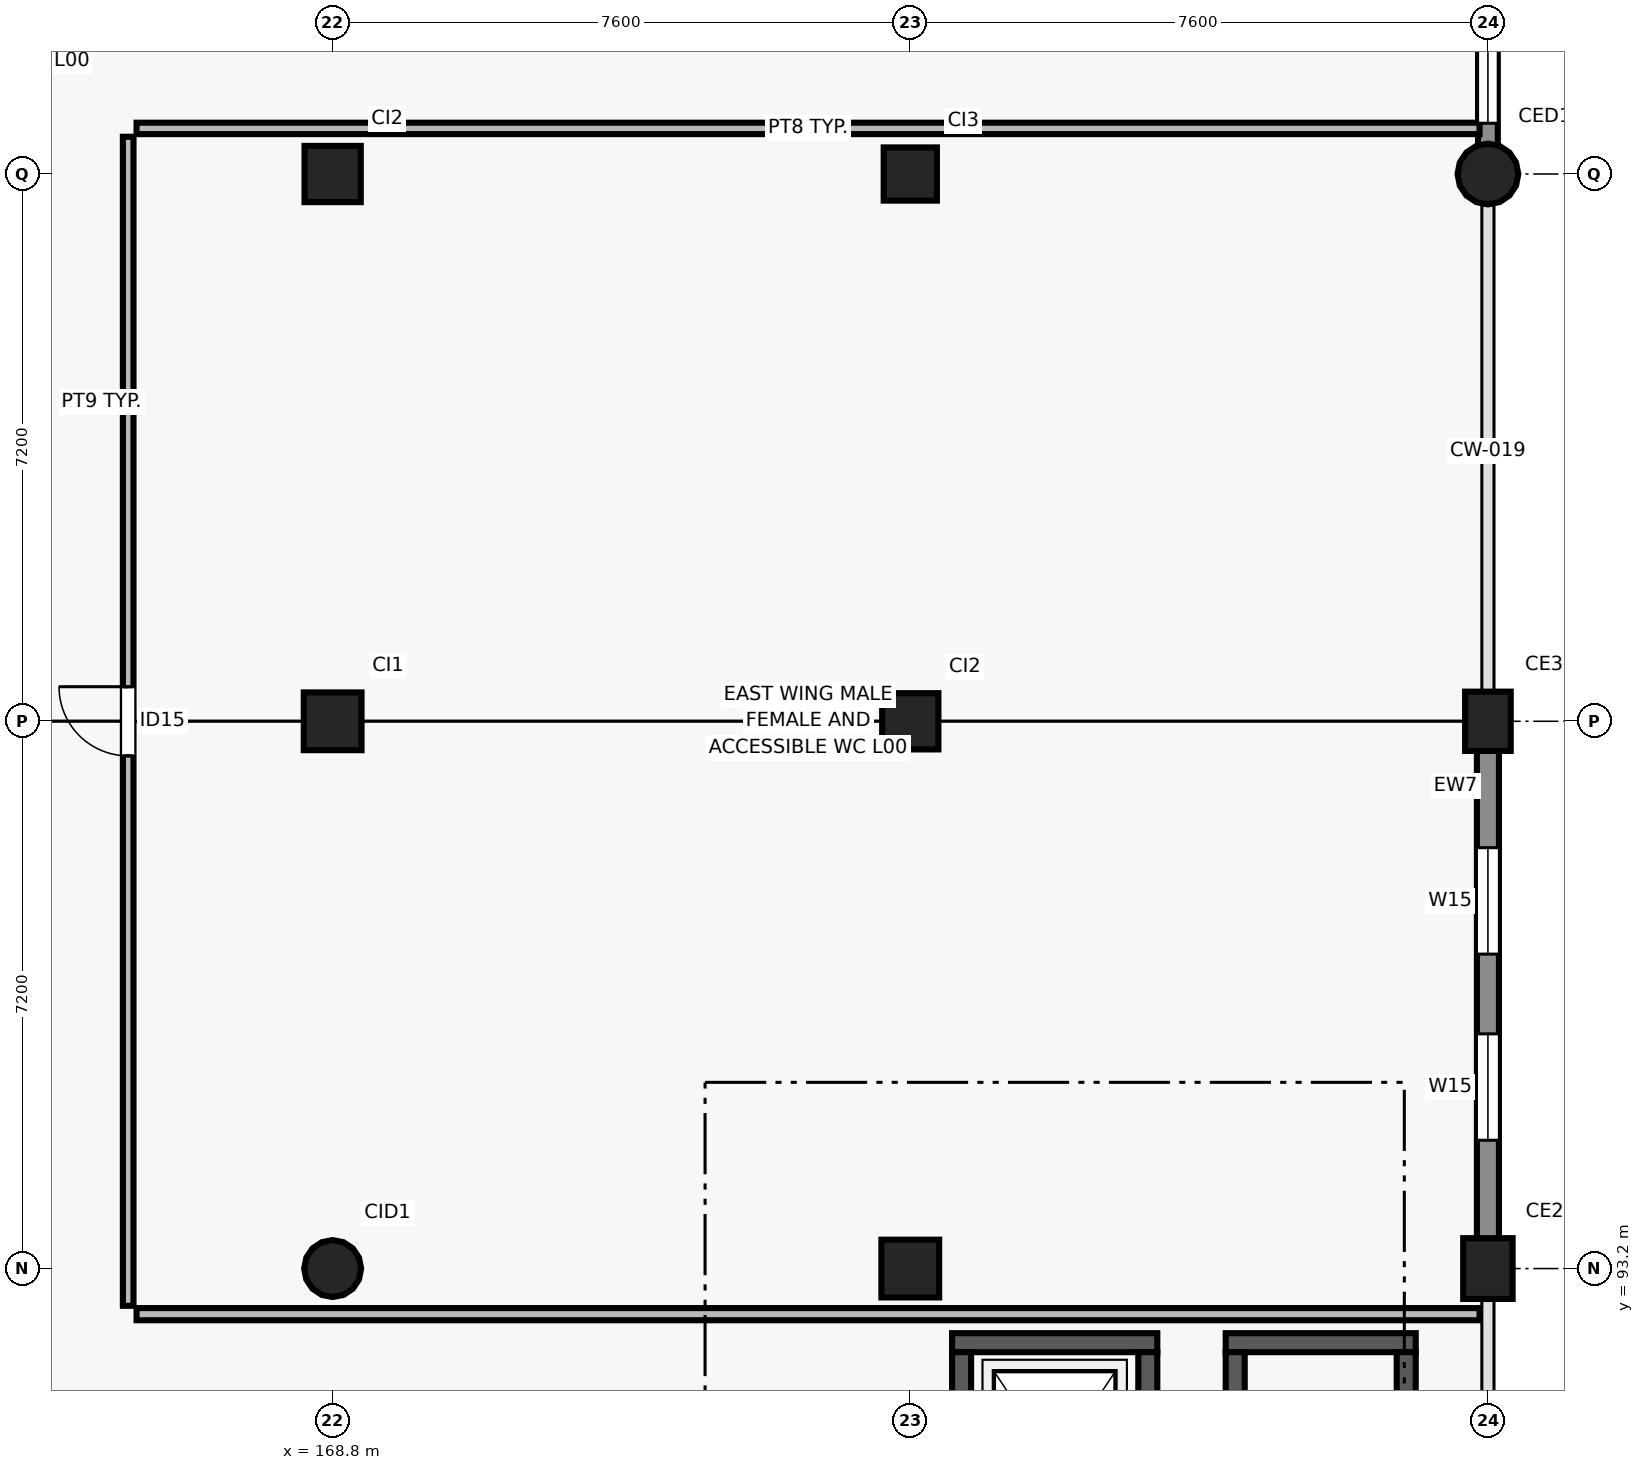
"""IFC4 building model, lengths in metres.
Left out: names, types, materials, properties, quantities, classifications, styles, units other than length and angle.
Written with IfcOpenShell. Run it as: python <this file> out.ifc"""

import sys

from ifc_helpers import new_model, si_unit, direction, frame, frame_2d, origin, origin_2d, place, context, subcontext, project, spatial, rectangle, circle, extrude, element, fill, save


model = new_model("IFC4")
c1 = context("Model", 3, precision=1e-05, world=origin(), true_north=direction((0.0, 1.0)))
c2 = subcontext(c1, "Body", "Model", "MODEL_VIEW")
j1 = project(units=[si_unit("LENGTHUNIT", "METRE"), si_unit("PLANEANGLEUNIT", "RADIAN")], contexts=[c1])
p1 = place(None, origin())
s1 = spatial("IfcSite", under=j1, at=p1, CompositionType="ELEMENT")
p2 = place(p1, origin())
s2 = spatial("IfcBuilding", under=s1, at=p2, CompositionType="ELEMENT")
p3 = place(p2, origin())
s3 = spatial("IfcBuildingStorey", under=s2, at=p3, CompositionType="ELEMENT", Elevation=0.0)
p4 = place(p3, frame((168.8, 93.2, 0.0), z_axis=(0.0, 0.0, 1.0), x_axis=(1.0, 0.0, 0.0)))
e1 = element("IfcColumn", 1, at=p4, inside=s3, PredefinedType="COLUMN", context=c2, shape_type="SweptSolid", body=[
    extrude(circle(Radius=0.375, at=origin_2d()), origin(), (0.0, 0.0, 1.0), 4.5),
])
p5 = place(p3, frame((168.8, 100.4, 0.0), z_axis=(0.0, 0.0, 1.0), x_axis=(1.0, 0.0, 0.0)))
e2 = element("IfcColumn", 2, at=p5, inside=s3, PredefinedType="COLUMN", context=c2, shape_type="SweptSolid", body=[
    extrude(rectangle(XDim=0.76, YDim=0.76, at=origin_2d()), origin(), (0.0, 0.0, 1.0), 4.5),
])
p6 = place(p3, frame((168.8, 107.6, 0.0), z_axis=(0.0, 0.0, 1.0), x_axis=(1.0, 0.0, 0.0)))
e3 = element("IfcColumn", 3, at=p6, inside=s3, PredefinedType="COLUMN", context=c2, shape_type="SweptSolid", body=[
    extrude(rectangle(XDim=0.74, YDim=0.74, at=origin_2d()), origin(), (0.0, 0.0, 1.0), 4.5),
])
p7 = place(p3, frame((176.4, 93.2, 0.0), z_axis=(0.0, 0.0, 1.0), x_axis=(1.0, 0.0, 0.0)))
e4 = element("IfcColumn", 4, at=p7, inside=s3, PredefinedType="COLUMN", context=c2, shape_type="SweptSolid", body=[
    extrude(rectangle(XDim=0.76, YDim=0.76, at=origin_2d()), origin(), (0.0, 0.0, 1.0), 4.5),
])
p8 = place(p3, frame((176.4, 100.4, 0.0), z_axis=(0.0, 0.0, 1.0), x_axis=(1.0, 0.0, 0.0)))
e5 = element("IfcColumn", 5, at=p8, inside=s3, PredefinedType="COLUMN", context=c2, shape_type="SweptSolid", body=[
    extrude(rectangle(XDim=0.74, YDim=0.74, at=origin_2d()), origin(), (0.0, 0.0, 1.0), 4.5),
])
p9 = place(p3, frame((176.4, 107.6, 0.0), z_axis=(0.0, 0.0, 1.0), x_axis=(1.0, 0.0, 0.0)))
e6 = element("IfcColumn", 6, at=p9, inside=s3, PredefinedType="COLUMN", context=c2, shape_type="SweptSolid", body=[
    extrude(rectangle(XDim=0.7, YDim=0.7, at=origin_2d()), origin(), (0.0, 0.0, 1.0), 4.5),
])
p10 = place(p3, frame((184.0, 93.2, 0.0), z_axis=(0.0, 0.0, 1.0), x_axis=(1.0, 0.0, 0.0)))
e7 = element("IfcColumn", 7, at=p10, inside=s3, PredefinedType="COLUMN", context=c2, shape_type="SweptSolid", body=[
    extrude(rectangle(XDim=0.8, YDim=0.65, at=origin_2d()), origin(), (0.0, 0.0, 1.0), 4.5),
])
p11 = place(p3, frame((184.0, 100.4, 0.0), z_axis=(0.0, 0.0, 1.0), x_axis=(1.0, 0.0, 0.0)))
e8 = element("IfcColumn", 8, at=p11, inside=s3, PredefinedType="COLUMN", context=c2, shape_type="SweptSolid", body=[
    extrude(rectangle(XDim=0.78, YDim=0.6, at=origin_2d()), origin(), (0.0, 0.0, 1.0), 4.5),
])
p12 = place(p3, frame((184.0, 107.6, 0.0), z_axis=(0.0, 0.0, 1.0), x_axis=(1.0, 0.0, 0.0)))
e9 = element("IfcColumn", 9, at=p12, inside=s3, PredefinedType="COLUMN", context=c2, shape_type="SweptSolid", body=[
    extrude(circle(Radius=0.4, at=origin_2d()), origin(), (0.0, 0.0, 1.0), 4.5),
])
p13 = place(p3, frame((184.0, 93.52, 0.0), z_axis=(0.0, 0.0, 1.0), x_axis=(0.0, 1.0, 0.0)))
e10 = element("IfcWall", 10, at=p13, inside=s3, PredefinedType="SOLIDWALL", context=c2, shape_type="SweptSolid", body=[
    extrude(rectangle(XDim=6.585, YDim=0.29, at=frame_2d((3.292, 0.0))), origin(), (0.0, 0.0, 1.0), 3.64),
])
p14 = place(p13, frame((1.368, 0.0, 0.9)))
e11 = element("IfcOpeningElement", 11, at=p14, cuts=e10, PredefinedType="OPENING", context=c2, shape_type="SweptSolid", body=[
    extrude(rectangle(XDim=1.4, YDim=1.5, at=frame_2d((0.7, 0.75))), frame((0.0, 0.155, 0.0), z_axis=(0.0, -1.0, 0.0), x_axis=(1.0, 0.0, 0.0)), (0.0, 0.0, 1.0), 0.31),
])
p15 = place(p13, frame((3.817, 0.0, 0.9)))
e12 = element("IfcOpeningElement", 12, at=p15, cuts=e10, PredefinedType="OPENING", context=c2, shape_type="SweptSolid", body=[
    extrude(rectangle(XDim=1.4, YDim=1.5, at=frame_2d((0.7, 0.75))), frame((0.0, 0.155, 0.0), z_axis=(0.0, -1.0, 0.0), x_axis=(1.0, 0.0, 0.0)), (0.0, 0.0, 1.0), 0.31),
])
p16 = place(p3, frame((184.0, 107.936, 0.0), z_axis=(0.0, 0.0, 1.0), x_axis=(0.0, 1.0, 0.0)))
e13 = element("IfcWall", 13, at=p16, inside=s3, PredefinedType="SOLIDWALL", context=c2, shape_type="SweptSolid", body=[
    extrude(rectangle(XDim=6.469, YDim=0.26, at=frame_2d((3.234, 0.0))), origin(), (0.0, 0.0, 1.0), 3.76),
])
p17 = place(p16, frame((0.332, 0.0, 0.9)))
e14 = element("IfcOpeningElement", 14, at=p17, cuts=e13, PredefinedType="OPENING", context=c2, shape_type="SweptSolid", body=[
    extrude(rectangle(XDim=2.4, YDim=1.25, at=frame_2d((1.2, 0.625))), frame((0.0, 0.14, 0.0), z_axis=(0.0, -1.0, 0.0), x_axis=(1.0, 0.0, 0.0)), (0.0, 0.0, 1.0), 0.28),
])
p18 = place(p16, frame((3.716, 0.0, 0.9)))
e15 = element("IfcOpeningElement", 15, at=p18, cuts=e13, PredefinedType="OPENING", context=c2, shape_type="SweptSolid", body=[
    extrude(rectangle(XDim=2.1, YDim=1.25, at=frame_2d((1.05, 0.625))), frame((0.0, 0.14, 0.0), z_axis=(0.0, -1.0, 0.0), x_axis=(1.0, 0.0, 0.0)), (0.0, 0.0, 1.0), 0.28),
])
p19 = place(p3, frame((176.95, 92.225, 0.0), z_axis=(0.0, 0.0, 1.0), x_axis=(1.0, 0.0, 0.0)))
e16 = element("IfcWall", 16, at=p19, inside=s3, PredefinedType="SHEAR", context=c2, shape_type="SweptSolid", body=[
    extrude(rectangle(XDim=2.7, YDim=0.25, at=frame_2d((1.35, 0.0))), origin(), (0.0, 0.0, 1.0), 4.22),
])
for number, where, z_axis, x_axis in (
    (17, (177.075, 89.2, 0.0), (0.0, 0.0, 1.0), (0.0, 1.0, 0.0)),
    (18, (179.525, 89.2, 0.0), (0.0, 0.0, 1.0), (0.0, 1.0, 0.0)),
):
    element("IfcWall", number, at=place(p3, frame(where, z_axis=z_axis, x_axis=x_axis)), inside=s3, PredefinedType="SHEAR", context=c2, shape_type="SweptSolid", body=[
        extrude(rectangle(XDim=2.9, YDim=0.25, at=frame_2d((1.45, 0.0))), origin(), (0.0, 0.0, 1.0), 4.22),
    ])
p20 = place(p3, frame((180.55, 92.225, 0.0), z_axis=(0.0, 0.0, 1.0), x_axis=(1.0, 0.0, 0.0)))
e19 = element("IfcWall", 19, at=p20, inside=s3, PredefinedType="SHEAR", context=c2, shape_type="SweptSolid", body=[
    extrude(rectangle(XDim=2.5, YDim=0.25, at=frame_2d((1.25, 0.0))), origin(), (0.0, 0.0, 1.0), 4.22),
])
for number, where, z_axis, x_axis in (
    (20, (180.675, 89.2, 0.0), (0.0, 0.0, 1.0), (0.0, 1.0, 0.0)),
    (21, (182.925, 89.2, 0.0), (0.0, 0.0, 1.0), (0.0, 1.0, 0.0)),
):
    element("IfcWall", number, at=place(p3, frame(where, z_axis=z_axis, x_axis=x_axis)), inside=s3, PredefinedType="SHEAR", context=c2, shape_type="SweptSolid", body=[
        extrude(rectangle(XDim=2.9, YDim=0.25, at=frame_2d((1.45, 0.0))), origin(), (0.0, 0.0, 1.0), 4.22),
    ])
p21 = place(p3, frame((166.22, 92.6, 0.0), z_axis=(0.0, 0.0, 1.0), x_axis=(1.0, 0.0, 0.0)))
e22 = element("IfcWall", 22, at=p21, inside=s3, PredefinedType="PARTITIONING", context=c2, shape_type="SweptSolid", body=[
    extrude(rectangle(XDim=17.67, YDim=0.16, at=frame_2d((8.835, 0.0))), origin(), (0.0, 0.0, 1.0), 4.2),
])
p22 = place(p3, frame((166.22, 108.2, 0.0), z_axis=(0.0, 0.0, 1.0), x_axis=(1.0, 0.0, 0.0)))
e23 = element("IfcWall", 23, at=p22, inside=s3, PredefinedType="PARTITIONING", context=c2, shape_type="SweptSolid", body=[
    extrude(rectangle(XDim=17.67, YDim=0.15, at=frame_2d((8.835, 0.0))), origin(), (0.0, 0.0, 1.0), 4.2),
])
p23 = place(p3, frame((166.11, 92.71, 0.0), z_axis=(0.0, 0.0, 1.0), x_axis=(0.0, 1.0, 0.0)))
e24 = element("IfcWall", 24, at=p23, inside=s3, PredefinedType="PARTITIONING", context=c2, shape_type="SweptSolid", body=[
    extrude(rectangle(XDim=15.38, YDim=0.14, at=frame_2d((7.69, 0.0))), origin(), (0.0, 0.0, 1.0), 4.2),
])
p24 = place(p23, frame((7.235, 0.0, 0.0)))
e25 = element("IfcOpeningElement", 25, at=p24, cuts=e24, PredefinedType="OPENING", context=c2, shape_type="SweptSolid", body=[
    extrude(rectangle(XDim=0.91, YDim=2.1, at=frame_2d((0.455, 1.05))), frame((0.0, 0.08, 0.0), z_axis=(0.0, -1.0, 0.0), x_axis=(1.0, 0.0, 0.0)), (0.0, 0.0, 1.0), 0.16),
])
p25 = place(p14, origin())
e26 = element("IfcWindow", 26, at=p25, inside=s3, PartitioningType="SINGLE_PANEL", PredefinedType="WINDOW", context=c2, shape_type="SweptSolid", body=[
    extrude(rectangle(XDim=1.4, YDim=1.5, at=frame_2d((0.7, 0.75))), frame((0.0, 0.03, 0.0), z_axis=(0.0, -1.0, 0.0), x_axis=(1.0, 0.0, 0.0)), (0.0, 0.0, 1.0), 0.06),
])
fill(e11, e26)
p26 = place(p15, origin())
e27 = element("IfcWindow", 27, at=p26, inside=s3, PartitioningType="SINGLE_PANEL", PredefinedType="WINDOW", context=c2, shape_type="SweptSolid", body=[
    extrude(rectangle(XDim=1.4, YDim=1.5, at=frame_2d((0.7, 0.75))), frame((0.0, 0.03, 0.0), z_axis=(0.0, -1.0, 0.0), x_axis=(1.0, 0.0, 0.0)), (0.0, 0.0, 1.0), 0.06),
])
fill(e12, e27)
p27 = place(p17, origin())
e28 = element("IfcWindow", 28, at=p27, inside=s3, PartitioningType="SINGLE_PANEL", PredefinedType="WINDOW", context=c2, shape_type="SweptSolid", body=[
    extrude(rectangle(XDim=2.4, YDim=1.25, at=frame_2d((1.2, 0.625))), frame((0.0, 0.03, 0.0), z_axis=(0.0, -1.0, 0.0), x_axis=(1.0, 0.0, 0.0)), (0.0, 0.0, 1.0), 0.06),
])
fill(e14, e28)
p28 = place(p24, origin())
e29 = element("IfcDoor", 29, at=p28, inside=s3, OperationType="SINGLE_SWING_RIGHT", PredefinedType="DOOR", context=c2, shape_type="SweptSolid", body=[
    extrude(rectangle(XDim=0.91, YDim=2.1, at=frame_2d((0.455, 1.05))), frame((0.0, 0.025, 0.0), z_axis=(0.0, -1.0, 0.0), x_axis=(1.0, 0.0, 0.0)), (0.0, 0.0, 1.0), 0.05),
])
fill(e25, e29)
save(model, sys.argv[1])
